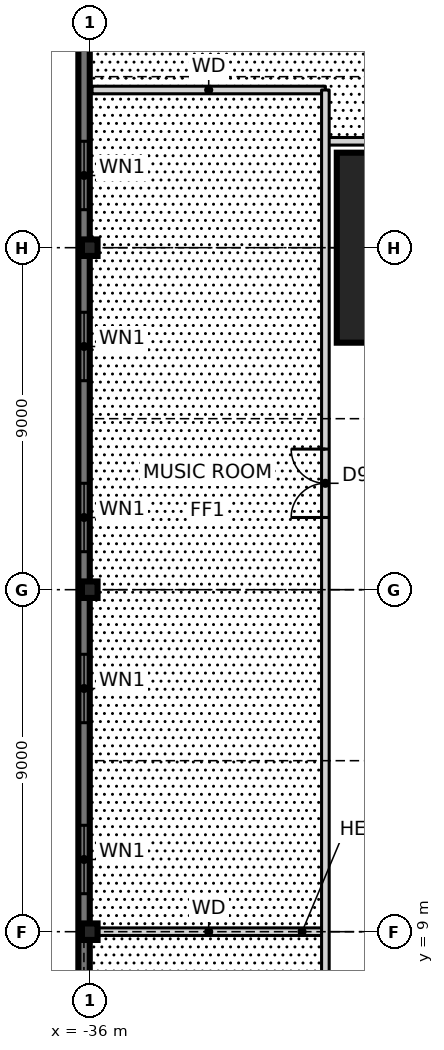
"""IFC4 building model, lengths in metres.
Left out: names, types, materials, properties, quantities, classifications, styles, units other than length and angle.
Written with IfcOpenShell. Run it as: python <this file> out.ifc"""

import sys

from ifc_helpers import new_model, si_unit, direction, frame, frame_2d, origin, origin_2d, place, context, subcontext, project, spatial, rectangle, i_section, extrude, element, fill, save


model = new_model("IFC4")
c1 = context("Model", 3, precision=1e-05, world=origin(), true_north=direction((0.0, 1.0)))
c2 = subcontext(c1, "Body", "Model", "MODEL_VIEW")
j1 = project(units=[si_unit("LENGTHUNIT", "METRE"), si_unit("PLANEANGLEUNIT", "RADIAN")], contexts=[c1])
p1 = place(None, origin())
s1 = spatial("IfcSite", under=j1, at=p1, CompositionType="ELEMENT")
p2 = place(p1, origin())
s2 = spatial("IfcBuilding", under=s1, at=p2, CompositionType="ELEMENT")
p3 = place(p2, frame((0.0, 0.0, 6.0)))
s3 = spatial("IfcBuildingStorey", under=s2, at=p3, CompositionType="ELEMENT", Elevation=6.0)
p4 = place(p3, frame((-27.0, 27.0, 0.0), z_axis=(0.0, 0.0, 1.0), x_axis=(1.0, 0.0, 0.0)))
e1 = element("IfcColumn", 1, at=p4, inside=s3, PredefinedType="COLUMN", context=c2, shape_type="SweptSolid", body=[
    extrude(rectangle(XDim=5.0, YDim=5.0, at=origin_2d()), origin(), (0.0, 0.0, 1.0), 4.5),
    extrude(i_section(OverallWidth=0.478, OverallDepth=0.599, WebThickness=0.1, FlangeThickness=0.14, at=origin_2d()), origin(), (0.0, 0.0, 1.0), 4.5),
])
for number, where, z_axis, x_axis in (
    (2, (-36.0, 9.0, 0.0), (0.0, 0.0, 1.0), (1.0, 0.0, 0.0)),
    (3, (-36.0, 18.0, 0.0), (0.0, 0.0, 1.0), (1.0, 0.0, 0.0)),
    (4, (-36.0, 27.0, 0.0), (0.0, 0.0, 1.0), (1.0, 0.0, 0.0)),
):
    element("IfcColumn", number, at=place(p3, frame(where, z_axis=z_axis, x_axis=x_axis)), inside=s3, PredefinedType="COLUMN", context=c2, shape_type="SweptSolid", body=[
        extrude(i_section(OverallWidth=0.411, OverallDepth=0.434, WebThickness=0.036, FlangeThickness=0.057, at=origin_2d()), origin(), (0.0, 0.0, 1.0), 4.5),
    ])
p5 = place(p3, frame((-36.15, 36.3, -0.25), z_axis=(0.0, 0.0, 1.0), x_axis=(0.0, -1.0, 0.0)))
e5 = element("IfcWall", 5, at=p5, inside=s3, PredefinedType="SOLIDWALL", context=c2, shape_type="SweptSolid", body=[
    extrude(rectangle(XDim=72.6, YDim=0.3, at=frame_2d((36.3, 0.0))), origin(), (0.0, 0.0, 1.0), 3.73),
])
p6 = place(p5, frame((2.0, 0.0, 1.15)))
e6 = element("IfcOpeningElement", 6, at=p6, cuts=e5, PredefinedType="OPENING", context=c2, shape_type="SweptSolid", body=[
    extrude(rectangle(XDim=1.8, YDim=2.4, at=frame_2d((0.9, 1.2))), frame((0.0, 0.16, 0.0), z_axis=(0.0, -1.0, 0.0), x_axis=(1.0, 0.0, 0.0)), (0.0, 0.0, 1.0), 0.32),
])
p7 = place(p5, frame((6.5, 0.0, 1.15)))
e7 = element("IfcOpeningElement", 7, at=p7, cuts=e5, PredefinedType="OPENING", context=c2, shape_type="SweptSolid", body=[
    extrude(rectangle(XDim=1.8, YDim=2.4, at=frame_2d((0.9, 1.2))), frame((0.0, 0.16, 0.0), z_axis=(0.0, -1.0, 0.0), x_axis=(1.0, 0.0, 0.0)), (0.0, 0.0, 1.0), 0.32),
])
p8 = place(p5, frame((11.0, 0.0, 1.15)))
e8 = element("IfcOpeningElement", 8, at=p8, cuts=e5, PredefinedType="OPENING", context=c2, shape_type="SweptSolid", body=[
    extrude(rectangle(XDim=1.8, YDim=2.4, at=frame_2d((0.9, 1.2))), frame((0.0, 0.16, 0.0), z_axis=(0.0, -1.0, 0.0), x_axis=(1.0, 0.0, 0.0)), (0.0, 0.0, 1.0), 0.32),
])
p9 = place(p5, frame((15.5, 0.0, 1.15)))
e9 = element("IfcOpeningElement", 9, at=p9, cuts=e5, PredefinedType="OPENING", context=c2, shape_type="SweptSolid", body=[
    extrude(rectangle(XDim=1.8, YDim=2.4, at=frame_2d((0.9, 1.2))), frame((0.0, 0.16, 0.0), z_axis=(0.0, -1.0, 0.0), x_axis=(1.0, 0.0, 0.0)), (0.0, 0.0, 1.0), 0.32),
])
p10 = place(p5, frame((20.0, 0.0, 1.15)))
e10 = element("IfcOpeningElement", 10, at=p10, cuts=e5, PredefinedType="OPENING", context=c2, shape_type="SweptSolid", body=[
    extrude(rectangle(XDim=1.8, YDim=2.4, at=frame_2d((0.9, 1.2))), frame((0.0, 0.16, 0.0), z_axis=(0.0, -1.0, 0.0), x_axis=(1.0, 0.0, 0.0)), (0.0, 0.0, 1.0), 0.32),
])
p11 = place(p5, frame((24.5, 0.0, 1.15)))
e11 = element("IfcOpeningElement", 11, at=p11, cuts=e5, PredefinedType="OPENING", context=c2, shape_type="SweptSolid", body=[
    extrude(rectangle(XDim=1.8, YDim=2.4, at=frame_2d((0.9, 1.2))), frame((0.0, 0.16, 0.0), z_axis=(0.0, -1.0, 0.0), x_axis=(1.0, 0.0, 0.0)), (0.0, 0.0, 1.0), 0.32),
])
p12 = place(p5, frame((29.0, 0.0, 1.15)))
e12 = element("IfcOpeningElement", 12, at=p12, cuts=e5, PredefinedType="OPENING", context=c2, shape_type="SweptSolid", body=[
    extrude(rectangle(XDim=1.8, YDim=2.4, at=frame_2d((0.9, 1.2))), frame((0.0, 0.16, 0.0), z_axis=(0.0, -1.0, 0.0), x_axis=(1.0, 0.0, 0.0)), (0.0, 0.0, 1.0), 0.32),
])
p13 = place(p5, frame((42.5, 0.0, 1.15)))
e13 = element("IfcOpeningElement", 13, at=p13, cuts=e5, PredefinedType="OPENING", context=c2, shape_type="SweptSolid", body=[
    extrude(rectangle(XDim=1.8, YDim=2.4, at=frame_2d((0.9, 1.2))), frame((0.0, 0.16, 0.0), z_axis=(0.0, -1.0, 0.0), x_axis=(1.0, 0.0, 0.0)), (0.0, 0.0, 1.0), 0.32),
])
p14 = place(p5, frame((47.0, 0.0, 1.15)))
e14 = element("IfcOpeningElement", 14, at=p14, cuts=e5, PredefinedType="OPENING", context=c2, shape_type="SweptSolid", body=[
    extrude(rectangle(XDim=1.8, YDim=2.4, at=frame_2d((0.9, 1.2))), frame((0.0, 0.16, 0.0), z_axis=(0.0, -1.0, 0.0), x_axis=(1.0, 0.0, 0.0)), (0.0, 0.0, 1.0), 0.32),
])
p15 = place(p5, frame((51.5, 0.0, 1.15)))
e15 = element("IfcOpeningElement", 15, at=p15, cuts=e5, PredefinedType="OPENING", context=c2, shape_type="SweptSolid", body=[
    extrude(rectangle(XDim=1.8, YDim=2.4, at=frame_2d((0.9, 1.2))), frame((0.0, 0.16, 0.0), z_axis=(0.0, -1.0, 0.0), x_axis=(1.0, 0.0, 0.0)), (0.0, 0.0, 1.0), 0.32),
])
p16 = place(p5, frame((56.0, 0.0, 1.15)))
e16 = element("IfcOpeningElement", 16, at=p16, cuts=e5, PredefinedType="OPENING", context=c2, shape_type="SweptSolid", body=[
    extrude(rectangle(XDim=1.8, YDim=2.4, at=frame_2d((0.9, 1.2))), frame((0.0, 0.16, 0.0), z_axis=(0.0, -1.0, 0.0), x_axis=(1.0, 0.0, 0.0)), (0.0, 0.0, 1.0), 0.32),
])
p17 = place(p5, frame((60.5, 0.0, 1.15)))
e17 = element("IfcOpeningElement", 17, at=p17, cuts=e5, PredefinedType="OPENING", context=c2, shape_type="SweptSolid", body=[
    extrude(rectangle(XDim=1.8, YDim=2.4, at=frame_2d((0.9, 1.2))), frame((0.0, 0.16, 0.0), z_axis=(0.0, -1.0, 0.0), x_axis=(1.0, 0.0, 0.0)), (0.0, 0.0, 1.0), 0.32),
])
p18 = place(p5, frame((65.0, 0.0, 1.15)))
e18 = element("IfcOpeningElement", 18, at=p18, cuts=e5, PredefinedType="OPENING", context=c2, shape_type="SweptSolid", body=[
    extrude(rectangle(XDim=1.8, YDim=2.4, at=frame_2d((0.9, 1.2))), frame((0.0, 0.16, 0.0), z_axis=(0.0, -1.0, 0.0), x_axis=(1.0, 0.0, 0.0)), (0.0, 0.0, 1.0), 0.32),
])
p19 = place(p5, frame((69.5, 0.0, 1.15)))
e19 = element("IfcOpeningElement", 19, at=p19, cuts=e5, PredefinedType="OPENING", context=c2, shape_type="SweptSolid", body=[
    extrude(rectangle(XDim=1.8, YDim=2.4, at=frame_2d((0.9, 1.2))), frame((0.0, 0.16, 0.0), z_axis=(0.0, -1.0, 0.0), x_axis=(1.0, 0.0, 0.0)), (0.0, 0.0, 1.0), 0.32),
])
p20 = place(p3, frame((-35.94, 9.0, 0.0), z_axis=(0.0, 0.0, 1.0), x_axis=(1.0, 0.0, 0.0)))
e20 = element("IfcWall", 20, at=p20, inside=s3, PredefinedType="SOLIDWALL", context=c2, shape_type="SweptSolid", body=[
    extrude(rectangle(XDim=6.14, YDim=0.2, at=frame_2d((3.07, 0.0))), origin(), (0.0, 0.0, 1.0), 3.48),
])
p21 = place(p3, frame((-29.8, 29.8, 0.0), z_axis=(0.0, 0.0, 1.0), x_axis=(1.0, 0.0, 0.0)))
e21 = element("IfcWall", 21, at=p21, inside=s3, PredefinedType="SOLIDWALL", context=c2, shape_type="SweptSolid", body=[
    extrude(rectangle(XDim=59.6, YDim=0.2, at=frame_2d((29.8, 0.0))), origin(), (0.0, 0.0, 1.0), 4.25),
])
p22 = place(p21, frame((8.1, 0.0, 0.0)))
e22 = element("IfcOpeningElement", 22, at=p22, cuts=e21, PredefinedType="OPENING", context=c2, shape_type="SweptSolid", body=[
    extrude(rectangle(XDim=1.8, YDim=2.1, at=frame_2d((0.9, 1.05))), frame((0.0, 0.11, 0.0), z_axis=(0.0, -1.0, 0.0), x_axis=(1.0, 0.0, 0.0)), (0.0, 0.0, 1.0), 0.22),
])
p23 = place(p21, frame((22.9, 0.0, 0.0)))
e23 = element("IfcOpeningElement", 23, at=p23, cuts=e21, PredefinedType="OPENING", context=c2, shape_type="SweptSolid", body=[
    extrude(rectangle(XDim=1.8, YDim=2.1, at=frame_2d((0.9, 1.05))), frame((0.0, 0.11, 0.0), z_axis=(0.0, -1.0, 0.0), x_axis=(1.0, 0.0, 0.0)), (0.0, 0.0, 1.0), 0.22),
])
p24 = place(p21, frame((28.9, 0.0, 0.0)))
e24 = element("IfcOpeningElement", 24, at=p24, cuts=e21, PredefinedType="OPENING", context=c2, shape_type="SweptSolid", body=[
    extrude(rectangle(XDim=1.8, YDim=2.1, at=frame_2d((0.9, 1.05))), frame((0.0, 0.11, 0.0), z_axis=(0.0, -1.0, 0.0), x_axis=(1.0, 0.0, 0.0)), (0.0, 0.0, 1.0), 0.22),
])
p25 = place(p21, frame((33.2, 0.0, 0.0)))
e25 = element("IfcOpeningElement", 25, at=p25, cuts=e21, PredefinedType="OPENING", context=c2, shape_type="SweptSolid", body=[
    extrude(rectangle(XDim=1.8, YDim=2.1, at=frame_2d((0.9, 1.05))), frame((0.0, 0.11, 0.0), z_axis=(0.0, -1.0, 0.0), x_axis=(1.0, 0.0, 0.0)), (0.0, 0.0, 1.0), 0.22),
])
p26 = place(p21, frame((41.0, 0.0, 0.0)))
e26 = element("IfcOpeningElement", 26, at=p26, cuts=e21, PredefinedType="OPENING", context=c2, shape_type="SweptSolid", body=[
    extrude(rectangle(XDim=1.8, YDim=2.1, at=frame_2d((0.9, 1.05))), frame((0.0, 0.11, 0.0), z_axis=(0.0, -1.0, 0.0), x_axis=(1.0, 0.0, 0.0)), (0.0, 0.0, 1.0), 0.22),
])
p27 = place(p21, frame((50.2, 0.0, 0.0)))
e27 = element("IfcOpeningElement", 27, at=p27, cuts=e21, PredefinedType="OPENING", context=c2, shape_type="SweptSolid", body=[
    extrude(rectangle(XDim=1.8, YDim=2.1, at=frame_2d((0.9, 1.05))), frame((0.0, 0.11, 0.0), z_axis=(0.0, -1.0, 0.0), x_axis=(1.0, 0.0, 0.0)), (0.0, 0.0, 1.0), 0.22),
])
p28 = place(p3, frame((-35.94, 31.15, 0.0), z_axis=(0.0, 0.0, 1.0), x_axis=(1.0, 0.0, 0.0)))
e28 = element("IfcWall", 28, at=p28, inside=s3, PredefinedType="SOLIDWALL", context=c2, shape_type="SweptSolid", body=[
    extrude(rectangle(XDim=6.14, YDim=0.2, at=frame_2d((3.07, 0.0))), origin(), (0.0, 0.0, 1.0), 4.25),
])
p29 = place(p3, frame((-29.8, -31.4, 0.0), z_axis=(0.0, 0.0, 1.0), x_axis=(0.0, 1.0, 0.0)))
e29 = element("IfcWall", 29, at=p29, inside=s3, PredefinedType="SOLIDWALL", context=c2, shape_type="SweptSolid", body=[
    extrude(rectangle(XDim=62.55, YDim=0.2, at=frame_2d((31.275, 0.0))), origin(), (0.0, 0.0, 1.0), 4.25),
])
p30 = place(p29, frame((8.9, 0.0, 0.0)))
e30 = element("IfcOpeningElement", 30, at=p30, cuts=e29, PredefinedType="OPENING", context=c2, shape_type="SweptSolid", body=[
    extrude(rectangle(XDim=1.8, YDim=2.1, at=frame_2d((0.9, 1.05))), frame((0.0, 0.11, 0.0), z_axis=(0.0, -1.0, 0.0), x_axis=(1.0, 0.0, 0.0)), (0.0, 0.0, 1.0), 0.22),
])
p31 = place(p29, frame((19.3, 0.0, 0.0)))
e31 = element("IfcOpeningElement", 31, at=p31, cuts=e29, PredefinedType="OPENING", context=c2, shape_type="SweptSolid", body=[
    extrude(rectangle(XDim=1.8, YDim=2.1, at=frame_2d((0.9, 1.05))), frame((0.0, 0.11, 0.0), z_axis=(0.0, -1.0, 0.0), x_axis=(1.0, 0.0, 0.0)), (0.0, 0.0, 1.0), 0.22),
])
p32 = place(p29, frame((24.15, 0.0, 0.0)))
e32 = element("IfcOpeningElement", 32, at=p32, cuts=e29, PredefinedType="OPENING", context=c2, shape_type="SweptSolid", body=[
    extrude(rectangle(XDim=1.8, YDim=2.1, at=frame_2d((0.9, 1.05))), frame((0.0, 0.11, 0.0), z_axis=(0.0, -1.0, 0.0), x_axis=(1.0, 0.0, 0.0)), (0.0, 0.0, 1.0), 0.22),
])
p33 = place(p29, frame((30.5, 0.0, 0.0)))
e33 = element("IfcOpeningElement", 33, at=p33, cuts=e29, PredefinedType="OPENING", context=c2, shape_type="SweptSolid", body=[
    extrude(rectangle(XDim=1.8, YDim=2.1, at=frame_2d((0.9, 1.05))), frame((0.0, 0.11, 0.0), z_axis=(0.0, -1.0, 0.0), x_axis=(1.0, 0.0, 0.0)), (0.0, 0.0, 1.0), 0.22),
])
p34 = place(p29, frame((36.85, 0.0, 0.0)))
e34 = element("IfcOpeningElement", 34, at=p34, cuts=e29, PredefinedType="OPENING", context=c2, shape_type="SweptSolid", body=[
    extrude(rectangle(XDim=1.8, YDim=2.1, at=frame_2d((0.9, 1.05))), frame((0.0, 0.11, 0.0), z_axis=(0.0, -1.0, 0.0), x_axis=(1.0, 0.0, 0.0)), (0.0, 0.0, 1.0), 0.22),
])
p35 = place(p29, frame((51.3, 0.0, 0.0)))
e35 = element("IfcOpeningElement", 35, at=p35, cuts=e29, PredefinedType="OPENING", context=c2, shape_type="SweptSolid", body=[
    extrude(rectangle(XDim=1.8, YDim=2.1, at=frame_2d((0.9, 1.05))), frame((0.0, 0.11, 0.0), z_axis=(0.0, -1.0, 0.0), x_axis=(1.0, 0.0, 0.0)), (0.0, 0.0, 1.0), 0.22),
])
p36 = place(p7, origin())
e36 = element("IfcWindow", 36, at=p36, inside=s3, PartitioningType="SINGLE_PANEL", PredefinedType="WINDOW", context=c2, shape_type="SweptSolid", body=[
    extrude(rectangle(XDim=1.8, YDim=2.4, at=frame_2d((0.9, 1.2))), frame((0.0, 0.03, 0.0), z_axis=(0.0, -1.0, 0.0), x_axis=(1.0, 0.0, 0.0)), (0.0, 0.0, 1.0), 0.06),
])
fill(e7, e36)
p37 = place(p8, origin())
e37 = element("IfcWindow", 37, at=p37, inside=s3, PartitioningType="SINGLE_PANEL", PredefinedType="WINDOW", context=c2, shape_type="SweptSolid", body=[
    extrude(rectangle(XDim=1.8, YDim=2.4, at=frame_2d((0.9, 1.2))), frame((0.0, 0.03, 0.0), z_axis=(0.0, -1.0, 0.0), x_axis=(1.0, 0.0, 0.0)), (0.0, 0.0, 1.0), 0.06),
])
fill(e8, e37)
p38 = place(p9, origin())
e38 = element("IfcWindow", 38, at=p38, inside=s3, PartitioningType="SINGLE_PANEL", PredefinedType="WINDOW", context=c2, shape_type="SweptSolid", body=[
    extrude(rectangle(XDim=1.8, YDim=2.4, at=frame_2d((0.9, 1.2))), frame((0.0, 0.03, 0.0), z_axis=(0.0, -1.0, 0.0), x_axis=(1.0, 0.0, 0.0)), (0.0, 0.0, 1.0), 0.06),
])
fill(e9, e38)
p39 = place(p10, origin())
e39 = element("IfcWindow", 39, at=p39, inside=s3, PartitioningType="SINGLE_PANEL", PredefinedType="WINDOW", context=c2, shape_type="SweptSolid", body=[
    extrude(rectangle(XDim=1.8, YDim=2.4, at=frame_2d((0.9, 1.2))), frame((0.0, 0.03, 0.0), z_axis=(0.0, -1.0, 0.0), x_axis=(1.0, 0.0, 0.0)), (0.0, 0.0, 1.0), 0.06),
])
fill(e10, e39)
p40 = place(p11, origin())
e40 = element("IfcWindow", 40, at=p40, inside=s3, PartitioningType="SINGLE_PANEL", PredefinedType="WINDOW", context=c2, shape_type="SweptSolid", body=[
    extrude(rectangle(XDim=1.8, YDim=2.4, at=frame_2d((0.9, 1.2))), frame((0.0, 0.03, 0.0), z_axis=(0.0, -1.0, 0.0), x_axis=(1.0, 0.0, 0.0)), (0.0, 0.0, 1.0), 0.06),
])
fill(e11, e40)
p41 = place(p35, origin())
e41 = element("IfcDoor", 41, at=p41, inside=s3, OperationType="DOUBLE_DOOR_SINGLE_SWING", PredefinedType="DOOR", context=c2, shape_type="SweptSolid", body=[
    extrude(rectangle(XDim=1.8, YDim=2.1, at=frame_2d((0.9, 1.05))), frame((0.0, 0.025, 0.0), z_axis=(0.0, -1.0, 0.0), x_axis=(1.0, 0.0, 0.0)), (0.0, 0.0, 1.0), 0.05),
])
fill(e35, e41)
save(model, sys.argv[1])
